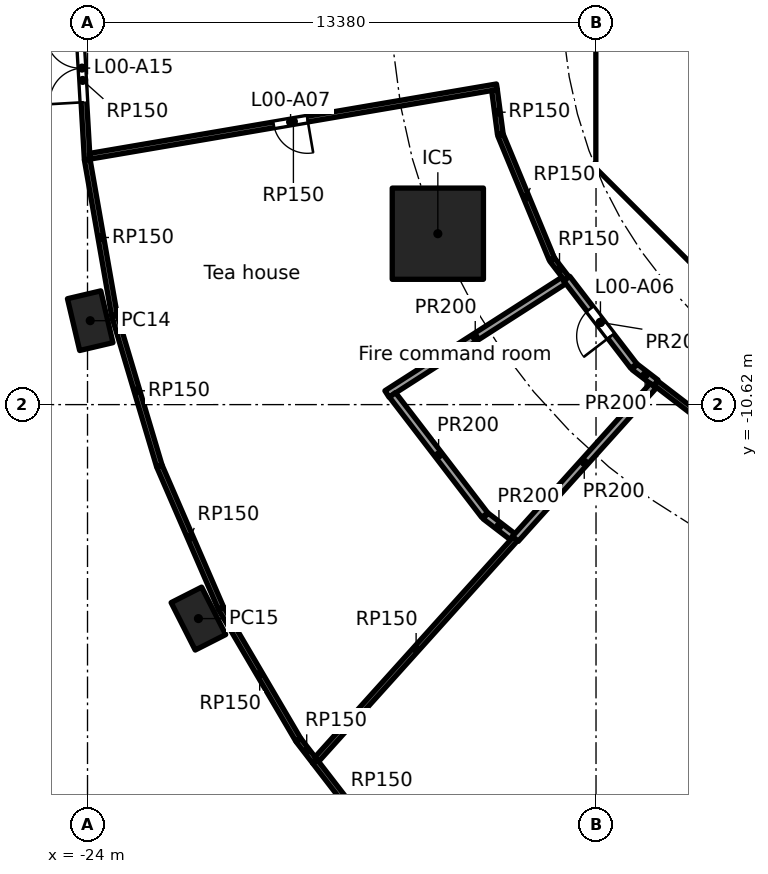
"""IFC4 building model, lengths in metres.
Left out: names, types, materials, properties, quantities, classifications, styles, units other than length and angle.
Written with IfcOpenShell. Run it as: python <this file> out.ifc"""

import sys

from ifc_helpers import new_model, si_unit, direction, frame, frame_2d, origin, origin_2d, place, context, subcontext, project, spatial, polyline, rectangle, hollow_rectangle, outline, extrude, element, fill, save


model = new_model("IFC4")
c1 = context("Model", 3, precision=1e-05, world=origin(), true_north=direction((0.0, 1.0)))
c2 = subcontext(c1, "Body", "Model", "MODEL_VIEW")
j1 = project(units=[si_unit("LENGTHUNIT", "METRE"), si_unit("PLANEANGLEUNIT", "RADIAN")], contexts=[c1])
p1 = place(None, origin())
s1 = spatial("IfcSite", under=j1, at=p1, CompositionType="ELEMENT")
p2 = place(p1, origin())
s2 = spatial("IfcBuilding", under=s1, at=p2, CompositionType="ELEMENT")
p3 = place(p2, origin())
s3 = spatial("IfcBuildingStorey", under=s2, at=p3, CompositionType="ELEMENT", Elevation=0.0)
for number, where, z_axis, x_axis in (
    (1, (-23.929, -8.412, 0.0), (0.0, 0.0, 1.0), (0.229, -0.973, 0.0)),
    (2, (-21.082, -16.25, 0.0), (0.0, 0.0, 1.0), (0.452, -0.892, 0.0)),
):
    element("IfcColumn", number, at=place(p3, frame(where, z_axis=z_axis, x_axis=x_axis)), inside=s3, PredefinedType="COLUMN", context=c2, shape_type="SweptSolid", body=[
        extrude(hollow_rectangle(XDim=1.4, YDim=0.9, WallThickness=0.05, at=origin_2d()), origin(), (0.0, 0.0, 1.0), 7.0),
    ])
p4 = place(p3, frame((-14.782, -6.123, 0.0), z_axis=(0.0, 0.0, 1.0), x_axis=(1.0, 0.0, 0.0)))
e3 = element("IfcColumn", 3, at=p4, inside=s3, PredefinedType="COLUMN", context=c2, shape_type="SweptSolid", body=[
    extrude(rectangle(XDim=2.4, YDim=2.4, at=origin_2d()), origin(), (0.0, 0.0, 1.0), 7.0),
])
p5 = place(p3, frame((-10.325, 3.801, 0.0), z_axis=(0.0, 0.0, 1.0), x_axis=(0.0, -1.0, 0.0)))
e4 = element("IfcWall", 4, at=p5, inside=s3, PredefinedType="SHEAR", context=c2, shape_type="SweptSolid", body=[
    extrude(rectangle(XDim=7.602, YDim=0.6, at=frame_2d((3.801, 0.0))), origin(), (0.0, 0.0, 1.0), 6.7),
])
p6 = place(p5, frame((0.651, 0.0, 0.0)))
e5 = element("IfcOpeningElement", 5, at=p6, cuts=e4, PredefinedType="OPENING", context=c2, shape_type="SweptSolid", body=[
    extrude(rectangle(XDim=1.5, YDim=2.1, at=frame_2d((0.75, 1.05))), frame((0.0, 0.31, 0.0), z_axis=(0.0, -1.0, 0.0), x_axis=(1.0, 0.0, 0.0)), (0.0, 0.0, 1.0), 0.62),
])
p7 = place(p5, frame((5.451, 0.0, 0.0)))
e6 = element("IfcOpeningElement", 6, at=p7, cuts=e4, PredefinedType="OPENING", context=c2, shape_type="SweptSolid", body=[
    extrude(rectangle(XDim=1.5, YDim=2.1, at=frame_2d((0.75, 1.05))), frame((0.0, 0.31, 0.0), z_axis=(0.0, -1.0, 0.0), x_axis=(1.0, 0.0, 0.0)), (0.0, 0.0, 1.0), 0.62),
])
p8 = place(p3, frame((-9.988, -4.613, 0.0), z_axis=(0.0, 0.0, 1.0), x_axis=(0.707106781187, -0.707106781187, 0.0)))
e7 = element("IfcWall", 7, at=p8, inside=s3, PredefinedType="SHEAR", context=c2, shape_type="SweptSolid", body=[
    extrude(rectangle(XDim=7.602, YDim=0.6, at=frame_2d((3.801, 0.0))), origin(), (0.0, 0.0, 1.0), 6.7),
])
p9 = place(p8, frame((6.151, 0.0, 0.0)))
e8 = element("IfcOpeningElement", 8, at=p9, cuts=e7, PredefinedType="OPENING", context=c2, shape_type="SweptSolid", body=[
    extrude(rectangle(XDim=1.1, YDim=2.1, at=frame_2d((0.55, 1.05))), frame((0.0, 0.31, 0.0), z_axis=(0.0, -1.0, 0.0), x_axis=(1.0, 0.0, 0.0)), (0.0, 0.0, 1.0), 0.62),
])
p10 = place(p3, origin())
e9 = element("IfcWall", 9, at=p10, inside=s3, PredefinedType="SHEAR", context=c2, shape_type="SweptSolid", body=[
    extrude(outline(polyline([(-10.625, -3.801), (-10.025, -3.801), (-10.025, -4.152), (-9.776, -4.401), (-10.2, -4.825), (-10.625, -4.401), (-10.625, -3.801)])), origin(), (0.0, 0.0, 1.0), 6.7),
])
p11 = place(p3, frame((-10.025, -4.0, 0.0), z_axis=(0.0, 0.0, 1.0), x_axis=(1.0, 0.0, 0.0)))
e10 = element("IfcWall", 10, at=p11, inside=s3, PredefinedType="PARTITIONING", context=c2, shape_type="SweptSolid", body=[
    extrude(rectangle(XDim=3.325, YDim=0.2, at=frame_2d((1.662, 0.0))), origin(), (0.0, 0.0, 1.0), 6.7),
])
p12 = place(p3, frame((-24.008, -4.173, 0.0), z_axis=(0.0, 0.0, 1.0), x_axis=(-0.05750459233, 0.998345241818, 0.0)))
e11 = element("IfcWall", 11, at=p12, inside=s3, PredefinedType="PARTITIONING", context=c2, shape_type="SweptSolid", body=[
    extrude(rectangle(XDim=4.173, YDim=0.15, at=frame_2d((2.087, 0.0))), origin(), (0.0, 0.0, 1.0), 6.7),
])
p13 = place(p12, frame((1.512, 0.0, 0.0)))
e12 = element("IfcOpeningElement", 12, at=p13, cuts=e11, PredefinedType="OPENING", context=c2, shape_type="SweptSolid", body=[
    extrude(rectangle(XDim=1.8, YDim=2.1, at=frame_2d((0.9, 1.05))), frame((0.0, 0.085, 0.0), z_axis=(0.0, -1.0, 0.0), x_axis=(1.0, 0.0, 0.0)), (0.0, 0.0, 1.0), 0.17),
])
p14 = place(p3, frame((-23.292, -8.271, 0.0), z_axis=(0.0, 0.0, 1.0), x_axis=(-0.172163826112, 0.985068331122, 0.0)))
e13 = element("IfcWall", 13, at=p14, inside=s3, PredefinedType="PARTITIONING", context=c2, shape_type="SweptSolid", body=[
    extrude(rectangle(XDim=4.158, YDim=0.15, at=frame_2d((2.079, 0.0))), origin(), (0.0, 0.0, 1.0), 6.7),
])
p15 = place(p3, frame((-22.112, -12.228, 0.0), z_axis=(0.0, 0.0, 1.0), x_axis=(-0.285840471929, 0.958277216993, 0.0)))
e14 = element("IfcWall", 14, at=p15, inside=s3, PredefinedType="PARTITIONING", context=c2, shape_type="SweptSolid", body=[
    extrude(rectangle(XDim=4.117, YDim=0.15, at=frame_2d((2.059, 0.0))), origin(), (0.0, 0.0, 1.0), 6.7),
])
p16 = place(p3, frame((-20.49, -15.972, 0.0), z_axis=(0.0, 0.0, 1.0), x_axis=(-0.39758890863, 0.917563654323, 0.0)))
e15 = element("IfcWall", 15, at=p16, inside=s3, PredefinedType="PARTITIONING", context=c2, shape_type="SweptSolid", body=[
    extrude(rectangle(XDim=4.067, YDim=0.15, at=frame_2d((2.034, 0.0))), origin(), (0.0, 0.0, 1.0), 6.7),
])
p17 = place(p3, frame((-18.456, -19.439, 0.0), z_axis=(0.0, 0.0, 1.0), x_axis=(-0.50633554765, 0.86233654288, 0.0)))
e16 = element("IfcWall", 16, at=p17, inside=s3, PredefinedType="PARTITIONING", context=c2, shape_type="SweptSolid", body=[
    extrude(rectangle(XDim=4.006, YDim=0.15, at=frame_2d((2.003, 0.0))), origin(), (0.0, 0.0, 1.0), 6.7),
])
p18 = place(p3, frame((-18.017, -20.01, 0.0), z_axis=(0.0, 0.0, 1.0), x_axis=(-0.610394995522, 0.792097184342, 0.0)))
e17 = element("IfcWall", 17, at=p18, inside=s3, PredefinedType="PARTITIONING", context=c2, shape_type="SweptSolid", body=[
    extrude(rectangle(XDim=0.707, YDim=0.15, at=frame_2d((0.354, 0.0))), origin(), (0.0, 0.0, 1.0), 6.7),
])
p19 = place(p3, frame((-16.045, -22.568, 0.0), z_axis=(0.0, 0.0, 1.0), x_axis=(-0.610433773772, 0.792067300069, 0.0)))
e18 = element("IfcWall", 18, at=p19, inside=s3, PredefinedType="PARTITIONING", context=c2, shape_type="SweptSolid", body=[
    extrude(rectangle(XDim=3.23, YDim=0.15, at=frame_2d((1.615, 0.0))), origin(), (0.0, 0.0, 1.0), 6.7),
])
p20 = place(p3, frame((-13.227, -2.257, 0.0), z_axis=(0.0, 0.0, 1.0), x_axis=(-0.985751332255, -0.168209128636, 0.0)))
e19 = element("IfcWall", 19, at=p20, inside=s3, PredefinedType="PARTITIONING", context=c2, shape_type="SweptSolid", body=[
    extrude(rectangle(XDim=10.865, YDim=0.15, at=frame_2d((5.433, 0.0))), origin(), (0.0, 0.0, 1.0), 6.7),
])
p21 = place(p20, frame((5.058, 0.0, 0.0)))
e20 = element("IfcOpeningElement", 20, at=p21, cuts=e19, PredefinedType="OPENING", context=c2, shape_type="SweptSolid", body=[
    extrude(rectangle(XDim=0.9, YDim=2.1, at=frame_2d((0.45, 1.05))), frame((0.0, 0.085, 0.0), z_axis=(0.0, -1.0, 0.0), x_axis=(1.0, 0.0, 0.0)), (0.0, 0.0, 1.0), 0.17),
])
p22 = place(p3, frame((-13.138, -3.508, 0.0), z_axis=(0.0, 0.0, 1.0), x_axis=(-0.130610530264, 0.99143375441, 0.0)))
e21 = element("IfcWall", 21, at=p22, inside=s3, PredefinedType="PARTITIONING", context=c2, shape_type="SweptSolid", body=[
    extrude(rectangle(XDim=1.174, YDim=0.15, at=frame_2d((0.587, 0.0))), origin(), (0.0, 0.0, 1.0), 6.7),
])
p23 = place(p3, frame((-12.742, -14.151, 0.0), z_axis=(0.0, 0.0, 1.0), x_axis=(-0.669109851661, -0.743163512566, 0.0)))
e22 = element("IfcWall", 22, at=p23, inside=s3, PredefinedType="PARTITIONING", context=c2, shape_type="SweptSolid", body=[
    extrude(rectangle(XDim=7.807, YDim=0.15, at=frame_2d((3.903, 0.0))), origin(), (0.0, 0.0, 1.0), 6.7),
])
p24 = place(p3, frame((-11.782, -6.789, 0.0), z_axis=(0.0, 0.0, 1.0), x_axis=(-0.382677866108, 0.923881838111, 0.0)))
e23 = element("IfcWall", 23, at=p24, inside=s3, PredefinedType="PARTITIONING", context=c2, shape_type="SweptSolid", body=[
    extrude(rectangle(XDim=3.527, YDim=0.15, at=frame_2d((1.763, 0.0))), origin(), (0.0, 0.0, 1.0), 6.7),
])
p25 = place(p3, frame((-11.39, -7.305, 0.0), z_axis=(0.0, 0.0, 1.0), x_axis=(-0.608652959463, 0.793436560121, 0.0)))
e24 = element("IfcWall", 24, at=p25, inside=s3, PredefinedType="PARTITIONING", context=c2, shape_type="SweptSolid", body=[
    extrude(rectangle(XDim=0.625, YDim=0.15, at=frame_2d((0.312, 0.0))), origin(), (0.0, 0.0, 1.0), 6.7),
])
p26 = place(p3, frame((-9.05, -10.051, 0.0), z_axis=(0.0, 0.0, 1.0), x_axis=(0.793365630445, -0.608745411834, 0.0)))
e25 = element("IfcWall", 25, at=p26, inside=s3, PredefinedType="PARTITIONING", context=c2, shape_type="SweptSolid", body=[
    extrude(rectangle(XDim=2.825, YDim=0.15, at=frame_2d((1.412, 0.0))), origin(), (0.0, 0.0, 1.0), 6.7),
])
p27 = place(p3, frame((-16.121, -10.339, 0.0), z_axis=(0.0, 0.0, 1.0), x_axis=(0.841785859203, 0.539811603474, 0.0)))
e26 = element("IfcWall", 26, at=p27, inside=s3, PredefinedType="PARTITIONING", context=c2, shape_type="SweptSolid", body=[
    extrude(rectangle(XDim=5.52, YDim=0.2, at=frame_2d((2.76, 0.0))), origin(), (0.0, 0.0, 1.0), 6.7),
])
p28 = place(p3, frame((-13.549, -13.527, 0.0), z_axis=(0.0, 0.0, 1.0), x_axis=(-0.608733632312, 0.793374668673, 0.0)))
e27 = element("IfcWall", 27, at=p28, inside=s3, PredefinedType="PARTITIONING", context=c2, shape_type="SweptSolid", body=[
    extrude(rectangle(XDim=3.987, YDim=0.2, at=frame_2d((1.993, 0.0))), origin(), (0.0, 0.0, 1.0), 6.7),
])
p29 = place(p3, frame((-12.822, -14.09, 0.0), z_axis=(0.0, 0.0, 1.0), x_axis=(-0.793398710545, 0.60870229678, 0.0)))
e28 = element("IfcWall", 28, at=p29, inside=s3, PredefinedType="PARTITIONING", context=c2, shape_type="SweptSolid", body=[
    extrude(rectangle(XDim=0.89, YDim=0.2, at=frame_2d((0.445, 0.0))), origin(), (0.0, 0.0, 1.0), 6.7),
])
p30 = place(p3, frame((-11.39, -7.305, 0.0), z_axis=(0.0, 0.0, 1.0), x_axis=(0.60873741789, -0.793371764094, 0.0)))
e29 = element("IfcWall", 29, at=p30, inside=s3, PredefinedType="PARTITIONING", context=c2, shape_type="SweptSolid", body=[
    extrude(rectangle(XDim=2.898, YDim=0.2, at=frame_2d((1.449, 0.0))), origin(), (0.0, 0.0, 1.0), 6.7),
])
p31 = place(p30, frame((1.007, 0.0, 0.0)))
e30 = element("IfcOpeningElement", 30, at=p31, cuts=e29, PredefinedType="OPENING", context=c2, shape_type="SweptSolid", body=[
    extrude(rectangle(XDim=0.9, YDim=2.1, at=frame_2d((0.45, 1.05))), frame((0.0, 0.11, 0.0), z_axis=(0.0, -1.0, 0.0), x_axis=(1.0, 0.0, 0.0)), (0.0, 0.0, 1.0), 0.22),
])
p32 = place(p3, frame((-9.605, -9.626, 0.0), z_axis=(0.0, 0.0, 1.0), x_axis=(0.793454504248, -0.608629566887, 0.0)))
e31 = element("IfcWall", 31, at=p32, inside=s3, PredefinedType="PARTITIONING", context=c2, shape_type="SweptSolid", body=[
    extrude(rectangle(XDim=0.699, YDim=0.2, at=frame_2d((0.349, 0.0))), origin(), (0.0, 0.0, 1.0), 6.7),
])
p33 = place(p3, frame((-9.117, -10.126, 0.0), z_axis=(0.0, 0.0, 1.0), x_axis=(-0.669134044303, -0.743141729925, 0.0)))
e32 = element("IfcWall", 32, at=p33, inside=s3, PredefinedType="PARTITIONING", context=c2, shape_type="SweptSolid", body=[
    extrude(rectangle(XDim=5.417, YDim=0.2, at=frame_2d((2.708, 0.0))), origin(), (0.0, 0.0, 1.0), 6.7),
])
p34 = place(p7, origin())
e33 = element("IfcDoor", 33, at=p34, inside=s3, OperationType="DOUBLE_DOOR_SINGLE_SWING", PredefinedType="DOOR", context=c2, shape_type="SweptSolid", body=[
    extrude(rectangle(XDim=1.5, YDim=2.1, at=frame_2d((0.75, 1.05))), frame((0.0, 0.025, 0.0), z_axis=(0.0, -1.0, 0.0), x_axis=(1.0, 0.0, 0.0)), (0.0, 0.0, 1.0), 0.05),
])
fill(e6, e33)
p35 = place(p31, frame((0.9, 0.0, 0.0), x_axis=(-1.0, 0.0, 0.0)))
e34 = element("IfcDoor", 34, at=p35, inside=s3, OperationType="SINGLE_SWING_LEFT", PredefinedType="DOOR", context=c2, shape_type="SweptSolid", body=[
    extrude(rectangle(XDim=0.9, YDim=2.1, at=frame_2d((0.45, 1.05))), frame((0.0, 0.025, 0.0), z_axis=(0.0, -1.0, 0.0), x_axis=(1.0, 0.0, 0.0)), (0.0, 0.0, 1.0), 0.05),
])
fill(e30, e34)
p36 = place(p21, origin())
e35 = element("IfcDoor", 35, at=p36, inside=s3, OperationType="SINGLE_SWING_LEFT", PredefinedType="DOOR", context=c2, shape_type="SweptSolid", body=[
    extrude(rectangle(XDim=0.9, YDim=2.1, at=frame_2d((0.45, 1.05))), frame((0.0, 0.025, 0.0), z_axis=(0.0, -1.0, 0.0), x_axis=(1.0, 0.0, 0.0)), (0.0, 0.0, 1.0), 0.05),
])
fill(e20, e35)
p37 = place(p13, origin())
e36 = element("IfcDoor", 36, at=p37, inside=s3, OperationType="DOUBLE_DOOR_SINGLE_SWING", PredefinedType="DOOR", context=c2, shape_type="SweptSolid", body=[
    extrude(rectangle(XDim=1.8, YDim=2.1, at=frame_2d((0.9, 1.05))), frame((0.0, 0.025, 0.0), z_axis=(0.0, -1.0, 0.0), x_axis=(1.0, 0.0, 0.0)), (0.0, 0.0, 1.0), 0.05),
])
fill(e12, e36)
save(model, sys.argv[1])
